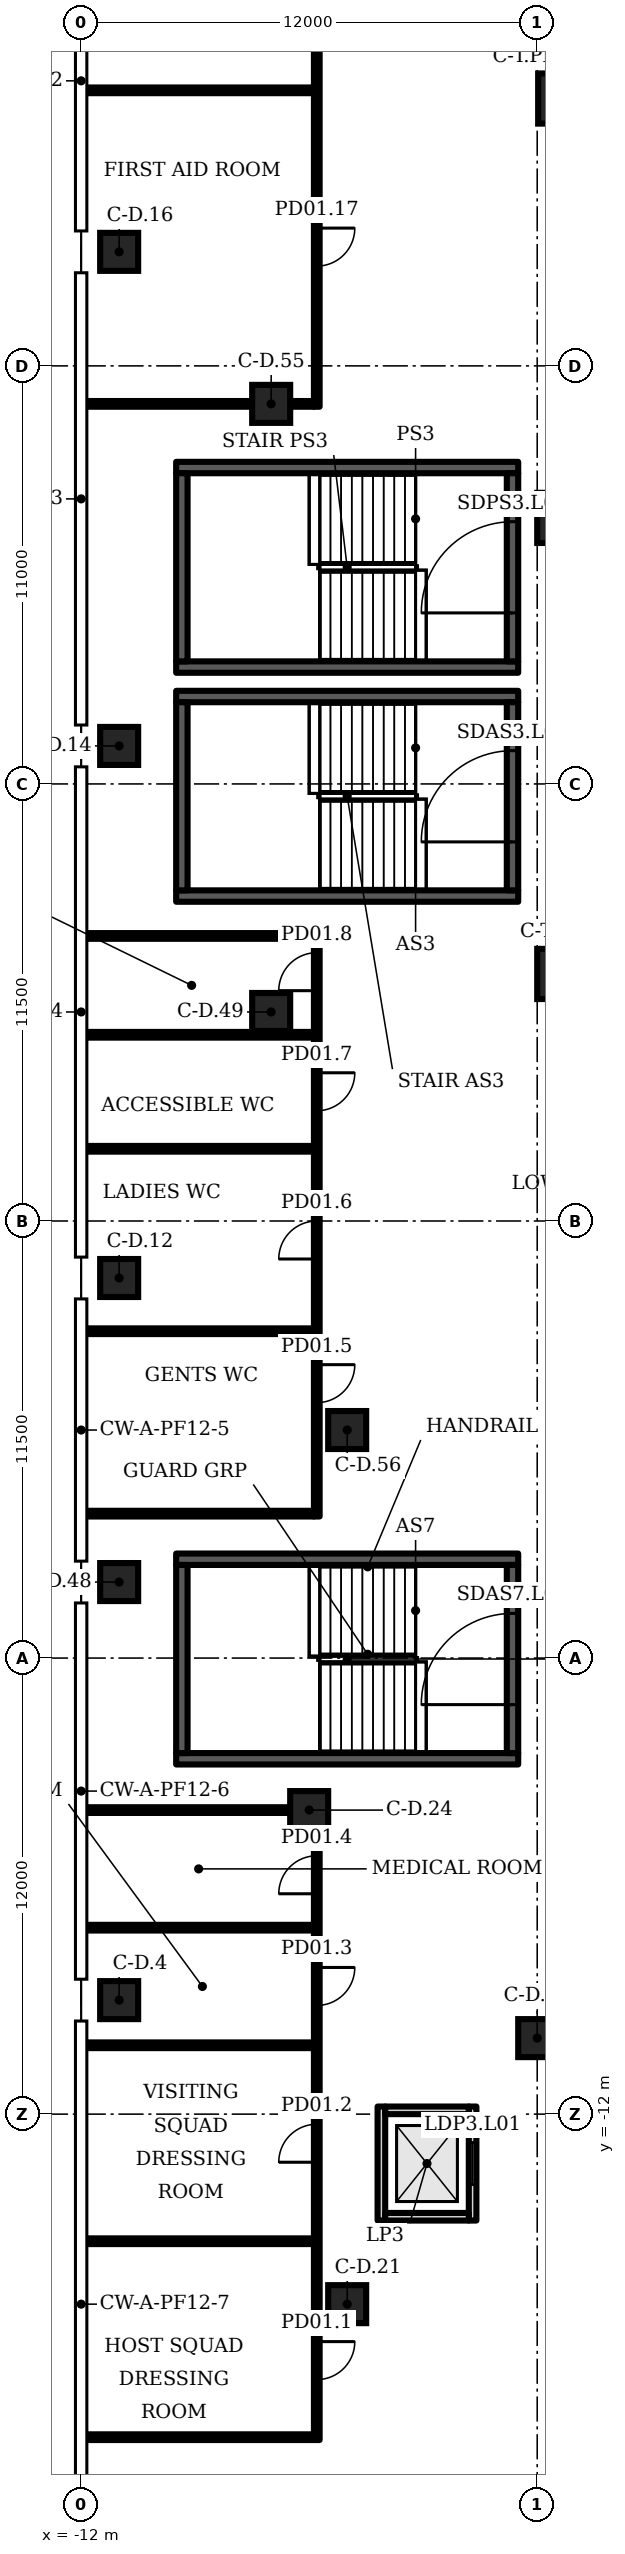
"""IFC4 building model, lengths in metres.
Left out: names, types, materials, properties, quantities, classifications, styles, units other than length and angle.
Written with IfcOpenShell. Run it as: python <this file> out.ifc"""

import sys

from ifc_helpers import new_model, si_unit, direction, frame, frame_2d, origin, origin_2d, place, context, subcontext, project, spatial, rectangle, extrude, element, fill, save


model = new_model("IFC4")
c1 = context("Model", 3, precision=1e-05, world=origin(), true_north=direction((0.0, 1.0)))
c2 = subcontext(c1, "Body", "Model", "MODEL_VIEW")
j1 = project(units=[si_unit("LENGTHUNIT", "METRE"), si_unit("PLANEANGLEUNIT", "RADIAN")], contexts=[c1])
p1 = place(None, origin())
s1 = spatial("IfcSite", under=j1, at=p1, CompositionType="ELEMENT")
p2 = place(p1, origin())
s2 = spatial("IfcBuilding", under=s1, at=p2, CompositionType="ELEMENT")
p3 = place(p2, frame((0.0, 0.0, 8.0)))
s3 = spatial("IfcBuildingStorey", under=s2, at=p3, CompositionType="ELEMENT", Elevation=8.0)
for number, where, z_axis, x_axis in (
    (1, (0.685, 41.034, 0.0), (0.0, 0.0, 1.0), (1.0, 0.0, 0.0)),
    (2, (0.66, 30.0, 0.0), (0.0, 0.0, 1.0), (1.0, 0.0, 0.0)),
    (3, (0.66, 18.0, 0.0), (0.0, 0.0, 1.0), (1.0, 0.0, 0.0)),
):
    element("IfcColumn", number, at=place(p3, frame(where, z_axis=z_axis, x_axis=x_axis)), inside=s3, PredefinedType="COLUMN", context=c2, shape_type="SweptSolid", body=[
        extrude(rectangle(XDim=1.32, YDim=1.32, at=origin_2d()), origin(), (0.0, 0.0, 1.0), 7.0),
    ])
for number, where, z_axis, x_axis in (
    (4, (-11.0, -9.0, 0.0), (0.0, 0.0, 1.0), (1.0, 0.0, 0.0)),
    (5, (-11.0, 10.0, 0.0), (0.0, 0.0, 1.0), (1.0, 0.0, 0.0)),
    (6, (-11.0, 24.0, 0.0), (0.0, 0.0, 1.0), (1.0, 0.0, 0.0)),
    (7, (-11.0, 37.0, 0.0), (0.0, 0.0, 1.0), (1.0, 0.0, 0.0)),
    (8, (-5.0, -17.0, 0.0), (0.0, 0.0, 1.0), (1.0, 0.0, 0.0)),
    (9, (-6.0, -4.0, 0.0), (0.0, 0.0, 1.0), (1.0, 0.0, 0.0)),
    (10, (0.0, -10.0, 0.0), (0.0, 0.0, 1.0), (1.0, 0.0, 0.0)),
    (11, (-11.0, 2.0, 0.0), (0.0, 0.0, 1.0), (1.0, 0.0, 0.0)),
    (12, (-7.0, 17.0, 0.0), (0.0, 0.0, 1.0), (1.0, 0.0, 0.0)),
    (13, (-7.0, 33.0, 0.0), (0.0, 0.0, 1.0), (1.0, 0.0, 0.0)),
    (14, (-5.0, 6.0, 0.0), (0.0, 0.0, 1.0), (1.0, 0.0, 0.0)),
):
    element("IfcColumn", number, at=place(p3, frame(where, z_axis=z_axis, x_axis=x_axis)), inside=s3, PredefinedType="COLUMN", context=c2, shape_type="SweptSolid", body=[
        extrude(rectangle(XDim=1.0, YDim=1.0, at=origin_2d()), origin(), (0.0, 0.0, 1.0), 7.0),
    ])
p4 = place(p3, frame((-11.895, -20.5, 0.0), z_axis=(0.0, 0.0, 1.0), x_axis=(1.0, 0.0, 0.0)))
e15 = element("IfcWall", 15, at=p4, inside=s3, PredefinedType="PARTITIONING", context=c2, shape_type="SweptSolid", body=[
    extrude(rectangle(XDim=6.02, YDim=0.15, at=frame_2d((3.01, 0.0))), origin(), (0.0, 0.0, 1.0), 6.7),
])
p5 = place(p3, frame((-5.8, -20.575, 0.0), z_axis=(0.0, 0.0, 1.0), x_axis=(0.0, 1.0, 0.0)))
e16 = element("IfcWall", 16, at=p5, inside=s3, PredefinedType="PARTITIONING", context=c2, shape_type="SweptSolid", body=[
    extrude(rectangle(XDim=16.065, YDim=0.15, at=frame_2d((8.032, 0.0))), origin(), (0.0, 0.0, 1.0), 6.7),
])
p6 = place(p5, frame((1.59, 0.0, 0.0)))
e17 = element("IfcOpeningElement", 17, at=p6, cuts=e16, PredefinedType="OPENING", context=c2, shape_type="SweptSolid", body=[
    extrude(rectangle(XDim=1.0, YDim=2.1, at=frame_2d((0.5, 1.05))), frame((0.0, 0.085, 0.0), z_axis=(0.0, -1.0, 0.0), x_axis=(1.0, 0.0, 0.0)), (0.0, 0.0, 1.0), 0.17),
])
p7 = place(p5, frame((7.309, 0.0, 0.0)))
e18 = element("IfcOpeningElement", 18, at=p7, cuts=e16, PredefinedType="OPENING", context=c2, shape_type="SweptSolid", body=[
    extrude(rectangle(XDim=1.0, YDim=2.1, at=frame_2d((0.5, 1.05))), frame((0.0, 0.085, 0.0), z_axis=(0.0, -1.0, 0.0), x_axis=(1.0, 0.0, 0.0)), (0.0, 0.0, 1.0), 0.17),
])
p8 = place(p5, frame((11.434, 0.0, 0.0)))
e19 = element("IfcOpeningElement", 19, at=p8, cuts=e16, PredefinedType="OPENING", context=c2, shape_type="SweptSolid", body=[
    extrude(rectangle(XDim=1.0, YDim=2.1, at=frame_2d((0.5, 1.05))), frame((0.0, 0.085, 0.0), z_axis=(0.0, -1.0, 0.0), x_axis=(1.0, 0.0, 0.0)), (0.0, 0.0, 1.0), 0.17),
])
p9 = place(p5, frame((14.373, 0.0, 0.0)))
e20 = element("IfcOpeningElement", 20, at=p9, cuts=e16, PredefinedType="OPENING", context=c2, shape_type="SweptSolid", body=[
    extrude(rectangle(XDim=1.0, YDim=2.1, at=frame_2d((0.5, 1.05))), frame((0.0, 0.085, 0.0), z_axis=(0.0, -1.0, 0.0), x_axis=(1.0, 0.0, 0.0)), (0.0, 0.0, 1.0), 0.17),
])
p10 = place(p3, frame((-5.8, 3.725, 0.0), z_axis=(0.0, 0.0, 1.0), x_axis=(0.0, 1.0, 0.0)))
e21 = element("IfcWall", 21, at=p10, inside=s3, PredefinedType="PARTITIONING", context=c2, shape_type="SweptSolid", body=[
    extrude(rectangle(XDim=15.35, YDim=0.15, at=frame_2d((7.675, 0.0))), origin(), (0.0, 0.0, 1.0), 6.7),
])
p11 = place(p10, frame((2.995, 0.0, 0.0)))
e22 = element("IfcOpeningElement", 22, at=p11, cuts=e21, PredefinedType="OPENING", context=c2, shape_type="SweptSolid", body=[
    extrude(rectangle(XDim=1.0, YDim=2.1, at=frame_2d((0.5, 1.05))), frame((0.0, 0.085, 0.0), z_axis=(0.0, -1.0, 0.0), x_axis=(1.0, 0.0, 0.0)), (0.0, 0.0, 1.0), 0.17),
])
p12 = place(p10, frame((6.775, 0.0, 0.0)))
e23 = element("IfcOpeningElement", 23, at=p12, cuts=e21, PredefinedType="OPENING", context=c2, shape_type="SweptSolid", body=[
    extrude(rectangle(XDim=1.0, YDim=2.1, at=frame_2d((0.5, 1.05))), frame((0.0, 0.085, 0.0), z_axis=(0.0, -1.0, 0.0), x_axis=(1.0, 0.0, 0.0)), (0.0, 0.0, 1.0), 0.17),
])
p13 = place(p10, frame((10.675, 0.0, 0.0)))
e24 = element("IfcOpeningElement", 24, at=p13, cuts=e21, PredefinedType="OPENING", context=c2, shape_type="SweptSolid", body=[
    extrude(rectangle(XDim=1.0, YDim=2.1, at=frame_2d((0.5, 1.05))), frame((0.0, 0.085, 0.0), z_axis=(0.0, -1.0, 0.0), x_axis=(1.0, 0.0, 0.0)), (0.0, 0.0, 1.0), 0.17),
])
p14 = place(p10, frame((13.835, 0.0, 0.0)))
e25 = element("IfcOpeningElement", 25, at=p14, cuts=e21, PredefinedType="OPENING", context=c2, shape_type="SweptSolid", body=[
    extrude(rectangle(XDim=1.0, YDim=2.1, at=frame_2d((0.5, 1.05))), frame((0.0, 0.085, 0.0), z_axis=(0.0, -1.0, 0.0), x_axis=(1.0, 0.0, 0.0)), (0.0, 0.0, 1.0), 0.17),
])
p15 = place(p3, frame((-5.8, 32.925, 0.0), z_axis=(0.0, 0.0, 1.0), x_axis=(0.0, 1.0, 0.0)))
e26 = element("IfcWall", 26, at=p15, inside=s3, PredefinedType="PARTITIONING", context=c2, shape_type="SweptSolid", body=[
    extrude(rectangle(XDim=16.65, YDim=0.15, at=frame_2d((8.325, 0.0))), origin(), (0.0, 0.0, 1.0), 6.7),
])
p16 = place(p15, frame((3.7, 0.0, 0.0)))
e27 = element("IfcOpeningElement", 27, at=p16, cuts=e26, PredefinedType="OPENING", context=c2, shape_type="SweptSolid", body=[
    extrude(rectangle(XDim=1.0, YDim=2.1, at=frame_2d((0.5, 1.05))), frame((0.0, 0.085, 0.0), z_axis=(0.0, -1.0, 0.0), x_axis=(1.0, 0.0, 0.0)), (0.0, 0.0, 1.0), 0.17),
])
p17 = place(p15, frame((11.95, 0.0, 0.0)))
e28 = element("IfcOpeningElement", 28, at=p17, cuts=e26, PredefinedType="OPENING", context=c2, shape_type="SweptSolid", body=[
    extrude(rectangle(XDim=1.0, YDim=2.1, at=frame_2d((0.5, 1.05))), frame((0.0, 0.085, 0.0), z_axis=(0.0, -1.0, 0.0), x_axis=(1.0, 0.0, 0.0)), (0.0, 0.0, 1.0), 0.17),
])
for number, where, z_axis, x_axis in (
    (29, (-11.895, -15.344, 0.0), (0.0, 0.0, 1.0), (1.0, 0.0, 0.0)),
    (30, (-11.895, -10.188, 0.0), (0.0, 0.0, 1.0), (1.0, 0.0, 0.0)),
    (31, (-11.895, -7.094, 0.0), (0.0, 0.0, 1.0), (1.0, 0.0, 0.0)),
):
    element("IfcWall", number, at=place(p3, frame(where, z_axis=z_axis, x_axis=x_axis)), inside=s3, PredefinedType="PARTITIONING", context=c2, shape_type="SweptSolid", body=[
        extrude(rectangle(XDim=6.02, YDim=0.15, at=frame_2d((3.01, 0.0))), origin(), (0.0, 0.0, 1.0), 6.7),
    ])
p18 = place(p3, frame((-11.895, -4.0, 0.0), z_axis=(0.0, 0.0, 1.0), x_axis=(1.0, 0.0, 0.0)))
e32 = element("IfcWall", 32, at=p18, inside=s3, PredefinedType="PARTITIONING", context=c2, shape_type="SweptSolid", body=[
    extrude(rectangle(XDim=5.385, YDim=0.15, at=frame_2d((2.692, 0.0))), origin(), (0.0, 0.0, 1.0), 6.7),
])
for number, where, z_axis, x_axis in (
    (33, (-11.895, 3.8, 0.0), (0.0, 0.0, 1.0), (1.0, 0.0, 0.0)),
    (34, (-11.895, 8.6, 0.0), (0.0, 0.0, 1.0), (1.0, 0.0, 0.0)),
    (35, (-11.895, 13.4, 0.0), (0.0, 0.0, 1.0), (1.0, 0.0, 0.0)),
    (36, (-11.895, 16.4, 0.0), (0.0, 0.0, 1.0), (1.0, 0.0, 0.0)),
    (37, (-11.895, 19.0, 0.0), (0.0, 0.0, 1.0), (1.0, 0.0, 0.0)),
):
    element("IfcWall", number, at=place(p3, frame(where, z_axis=z_axis, x_axis=x_axis)), inside=s3, PredefinedType="PARTITIONING", context=c2, shape_type="SweptSolid", body=[
        extrude(rectangle(XDim=6.02, YDim=0.15, at=frame_2d((3.01, 0.0))), origin(), (0.0, 0.0, 1.0), 6.7),
    ])
p19 = place(p3, frame((-11.895, 33.0, 0.0), z_axis=(0.0, 0.0, 1.0), x_axis=(1.0, 0.0, 0.0)))
e38 = element("IfcWall", 38, at=p19, inside=s3, PredefinedType="PARTITIONING", context=c2, shape_type="SweptSolid", body=[
    extrude(rectangle(XDim=4.385, YDim=0.15, at=frame_2d((2.192, 0.0))), origin(), (0.0, 0.0, 1.0), 6.7),
])
p20 = place(p3, frame((-6.49, 33.0, 0.0), z_axis=(0.0, 0.0, 1.0), x_axis=(1.0, 0.0, 0.0)))
e39 = element("IfcWall", 39, at=p20, inside=s3, PredefinedType="PARTITIONING", context=c2, shape_type="SweptSolid", body=[
    extrude(rectangle(XDim=0.615, YDim=0.15, at=frame_2d((0.308, 0.0))), origin(), (0.0, 0.0, 1.0), 6.7),
])
p21 = place(p3, frame((-11.895, 41.25, 0.0), z_axis=(0.0, 0.0, 1.0), x_axis=(1.0, 0.0, 0.0)))
e40 = element("IfcWall", 40, at=p21, inside=s3, PredefinedType="PARTITIONING", context=c2, shape_type="SweptSolid", body=[
    extrude(rectangle(XDim=6.02, YDim=0.15, at=frame_2d((3.01, 0.0))), origin(), (0.0, 0.0, 1.0), 6.7),
])
for number, where, z_axis, x_axis in (
    (41, (-9.5, -2.65, 0.0), (0.0, 0.0, 1.0), (1.0, 0.0, 0.0)),
    (42, (-9.5, 2.6, 0.0), (0.0, 0.0, 1.0), (1.0, 0.0, 0.0)),
):
    element("IfcWall", number, at=place(p3, frame(where, z_axis=z_axis, x_axis=x_axis)), inside=s3, PredefinedType="SHEAR", context=c2, shape_type="SweptSolid", body=[
        extrude(rectangle(XDim=9.0, YDim=0.3, at=frame_2d((4.5, 0.0))), origin(), (0.0, 0.0, 1.0), 6.7),
    ])
p22 = place(p3, frame((-9.35, -2.5, 0.0), z_axis=(0.0, 0.0, 1.0), x_axis=(0.0, 1.0, 0.0)))
e43 = element("IfcWall", 43, at=p22, inside=s3, PredefinedType="SHEAR", context=c2, shape_type="SweptSolid", body=[
    extrude(rectangle(XDim=4.95, YDim=0.3, at=frame_2d((2.475, 0.0))), origin(), (0.0, 0.0, 1.0), 6.7),
])
p23 = place(p3, frame((-0.65, -2.5, 0.0), z_axis=(0.0, 0.0, 1.0), x_axis=(0.0, 1.0, 0.0)))
e44 = element("IfcWall", 44, at=p23, inside=s3, PredefinedType="SHEAR", context=c2, shape_type="SweptSolid", body=[
    extrude(rectangle(XDim=4.95, YDim=0.3, at=frame_2d((2.475, 0.0))), origin(), (0.0, 0.0, 1.0), 6.7),
])
p24 = place(p23, frame((1.275, 0.0, 0.0)))
e45 = element("IfcOpeningElement", 45, at=p24, cuts=e44, PredefinedType="OPENING", context=c2, shape_type="SweptSolid", body=[
    extrude(rectangle(XDim=2.4, YDim=2.1, at=frame_2d((1.2, 1.05))), frame((0.0, 0.16, 0.0), z_axis=(0.0, -1.0, 0.0), x_axis=(1.0, 0.0, 0.0)), (0.0, 0.0, 1.0), 0.32),
])
for number, where, z_axis, x_axis in (
    (46, (-9.5, 20.05, 0.0), (0.0, 0.0, 1.0), (1.0, 0.0, 0.0)),
    (47, (-9.5, 25.3, 0.0), (0.0, 0.0, 1.0), (1.0, 0.0, 0.0)),
):
    element("IfcWall", number, at=place(p3, frame(where, z_axis=z_axis, x_axis=x_axis)), inside=s3, PredefinedType="SHEAR", context=c2, shape_type="SweptSolid", body=[
        extrude(rectangle(XDim=9.0, YDim=0.3, at=frame_2d((4.5, 0.0))), origin(), (0.0, 0.0, 1.0), 6.7),
    ])
p25 = place(p3, frame((-9.35, 20.2, 0.0), z_axis=(0.0, 0.0, 1.0), x_axis=(0.0, 1.0, 0.0)))
e48 = element("IfcWall", 48, at=p25, inside=s3, PredefinedType="SHEAR", context=c2, shape_type="SweptSolid", body=[
    extrude(rectangle(XDim=4.95, YDim=0.3, at=frame_2d((2.475, 0.0))), origin(), (0.0, 0.0, 1.0), 6.7),
])
p26 = place(p3, frame((-0.65, 20.2, 0.0), z_axis=(0.0, 0.0, 1.0), x_axis=(0.0, 1.0, 0.0)))
e49 = element("IfcWall", 49, at=p26, inside=s3, PredefinedType="SHEAR", context=c2, shape_type="SweptSolid", body=[
    extrude(rectangle(XDim=4.95, YDim=0.3, at=frame_2d((2.475, 0.0))), origin(), (0.0, 0.0, 1.0), 6.7),
])
p27 = place(p26, frame((1.275, 0.0, 0.0)))
e50 = element("IfcOpeningElement", 50, at=p27, cuts=e49, PredefinedType="OPENING", context=c2, shape_type="SweptSolid", body=[
    extrude(rectangle(XDim=2.4, YDim=2.1, at=frame_2d((1.2, 1.05))), frame((0.0, 0.16, 0.0), z_axis=(0.0, -1.0, 0.0), x_axis=(1.0, 0.0, 0.0)), (0.0, 0.0, 1.0), 0.32),
])
for number, where, z_axis, x_axis in (
    (51, (-9.5, 26.075, 0.0), (0.0, 0.0, 1.0), (1.0, 0.0, 0.0)),
    (52, (-9.5, 31.325, 0.0), (0.0, 0.0, 1.0), (1.0, 0.0, 0.0)),
):
    element("IfcWall", number, at=place(p3, frame(where, z_axis=z_axis, x_axis=x_axis)), inside=s3, PredefinedType="SHEAR", context=c2, shape_type="SweptSolid", body=[
        extrude(rectangle(XDim=9.0, YDim=0.3, at=frame_2d((4.5, 0.0))), origin(), (0.0, 0.0, 1.0), 6.7),
    ])
p28 = place(p3, frame((-9.35, 26.225, 0.0), z_axis=(0.0, 0.0, 1.0), x_axis=(0.0, 1.0, 0.0)))
e53 = element("IfcWall", 53, at=p28, inside=s3, PredefinedType="SHEAR", context=c2, shape_type="SweptSolid", body=[
    extrude(rectangle(XDim=4.95, YDim=0.3, at=frame_2d((2.475, 0.0))), origin(), (0.0, 0.0, 1.0), 6.7),
])
p29 = place(p3, frame((-0.65, 26.225, 0.0), z_axis=(0.0, 0.0, 1.0), x_axis=(0.0, 1.0, 0.0)))
e54 = element("IfcWall", 54, at=p29, inside=s3, PredefinedType="SHEAR", context=c2, shape_type="SweptSolid", body=[
    extrude(rectangle(XDim=4.95, YDim=0.3, at=frame_2d((2.475, 0.0))), origin(), (0.0, 0.0, 1.0), 6.7),
])
p30 = place(p29, frame((1.275, 0.0, 0.0)))
e55 = element("IfcOpeningElement", 55, at=p30, cuts=e54, PredefinedType="OPENING", context=c2, shape_type="SweptSolid", body=[
    extrude(rectangle(XDim=2.4, YDim=2.1, at=frame_2d((1.2, 1.05))), frame((0.0, 0.16, 0.0), z_axis=(0.0, -1.0, 0.0), x_axis=(1.0, 0.0, 0.0)), (0.0, 0.0, 1.0), 0.32),
])
p31 = place(p3, frame((-4.1, -14.8, 0.0), z_axis=(0.0, 0.0, 1.0), x_axis=(0.0, 1.0, 0.0)))
e56 = element("IfcWall", 56, at=p31, inside=s3, PredefinedType="PARTITIONING", context=c2, shape_type="SweptSolid", body=[
    extrude(rectangle(XDim=3.0, YDim=0.2, at=frame_2d((1.5, 0.0))), origin(), (0.0, 0.0, 1.0), 6.7),
])
p32 = place(p3, frame((-1.7, -14.8, 0.0), z_axis=(0.0, 0.0, 1.0), x_axis=(0.0, 1.0, 0.0)))
e57 = element("IfcWall", 57, at=p32, inside=s3, PredefinedType="PARTITIONING", context=c2, shape_type="SweptSolid", body=[
    extrude(rectangle(XDim=3.0, YDim=0.2, at=frame_2d((1.5, 0.0))), origin(), (0.0, 0.0, 1.0), 6.7),
])
p33 = place(p32, frame((0.95, 0.0, 0.0)))
e58 = element("IfcOpeningElement", 58, at=p33, cuts=e57, PredefinedType="OPENING", context=c2, shape_type="SweptSolid", body=[
    extrude(rectangle(XDim=1.1, YDim=2.1, at=frame_2d((0.55, 1.05))), frame((0.0, 0.11, 0.0), z_axis=(0.0, -1.0, 0.0), x_axis=(1.0, 0.0, 0.0)), (0.0, 0.0, 1.0), 0.22),
])
for number, where, z_axis, x_axis in (
    (59, (-4.0, -14.7, 0.0), (0.0, 0.0, 1.0), (1.0, 0.0, 0.0)),
    (60, (-4.0, -11.9, 0.0), (0.0, 0.0, 1.0), (1.0, 0.0, 0.0)),
):
    element("IfcWall", number, at=place(p3, frame(where, z_axis=z_axis, x_axis=x_axis)), inside=s3, PredefinedType="PARTITIONING", context=c2, shape_type="SweptSolid", body=[
        extrude(rectangle(XDim=2.2, YDim=0.2, at=frame_2d((1.1, 0.0))), origin(), (0.0, 0.0, 1.0), 6.7),
    ])
p34 = place(p6, origin())
e61 = element("IfcDoor", 61, at=p34, inside=s3, OperationType="SINGLE_SWING_RIGHT", PredefinedType="DOOR", context=c2, shape_type="SweptSolid", body=[
    extrude(rectangle(XDim=1.0, YDim=2.1, at=frame_2d((0.5, 1.05))), frame((0.0, 0.025, 0.0), z_axis=(0.0, -1.0, 0.0), x_axis=(1.0, 0.0, 0.0)), (0.0, 0.0, 1.0), 0.05),
])
fill(e17, e61)
p35 = place(p7, origin())
e62 = element("IfcDoor", 62, at=p35, inside=s3, OperationType="SINGLE_SWING_LEFT", PredefinedType="DOOR", context=c2, shape_type="SweptSolid", body=[
    extrude(rectangle(XDim=1.0, YDim=2.1, at=frame_2d((0.5, 1.05))), frame((0.0, 0.025, 0.0), z_axis=(0.0, -1.0, 0.0), x_axis=(1.0, 0.0, 0.0)), (0.0, 0.0, 1.0), 0.05),
])
fill(e18, e62)
p36 = place(p8, origin())
e63 = element("IfcDoor", 63, at=p36, inside=s3, OperationType="SINGLE_SWING_RIGHT", PredefinedType="DOOR", context=c2, shape_type="SweptSolid", body=[
    extrude(rectangle(XDim=1.0, YDim=2.1, at=frame_2d((0.5, 1.05))), frame((0.0, 0.025, 0.0), z_axis=(0.0, -1.0, 0.0), x_axis=(1.0, 0.0, 0.0)), (0.0, 0.0, 1.0), 0.05),
])
fill(e19, e63)
p37 = place(p9, origin())
e64 = element("IfcDoor", 64, at=p37, inside=s3, OperationType="SINGLE_SWING_LEFT", PredefinedType="DOOR", context=c2, shape_type="SweptSolid", body=[
    extrude(rectangle(XDim=1.0, YDim=2.1, at=frame_2d((0.5, 1.05))), frame((0.0, 0.025, 0.0), z_axis=(0.0, -1.0, 0.0), x_axis=(1.0, 0.0, 0.0)), (0.0, 0.0, 1.0), 0.05),
])
fill(e20, e64)
p38 = place(p11, origin())
e65 = element("IfcDoor", 65, at=p38, inside=s3, OperationType="SINGLE_SWING_RIGHT", PredefinedType="DOOR", context=c2, shape_type="SweptSolid", body=[
    extrude(rectangle(XDim=1.0, YDim=2.1, at=frame_2d((0.5, 1.05))), frame((0.0, 0.025, 0.0), z_axis=(0.0, -1.0, 0.0), x_axis=(1.0, 0.0, 0.0)), (0.0, 0.0, 1.0), 0.05),
])
fill(e22, e65)
p39 = place(p12, origin())
e66 = element("IfcDoor", 66, at=p39, inside=s3, OperationType="SINGLE_SWING_LEFT", PredefinedType="DOOR", context=c2, shape_type="SweptSolid", body=[
    extrude(rectangle(XDim=1.0, YDim=2.1, at=frame_2d((0.5, 1.05))), frame((0.0, 0.025, 0.0), z_axis=(0.0, -1.0, 0.0), x_axis=(1.0, 0.0, 0.0)), (0.0, 0.0, 1.0), 0.05),
])
fill(e23, e66)
p40 = place(p13, origin())
e67 = element("IfcDoor", 67, at=p40, inside=s3, OperationType="SINGLE_SWING_RIGHT", PredefinedType="DOOR", context=c2, shape_type="SweptSolid", body=[
    extrude(rectangle(XDim=1.0, YDim=2.1, at=frame_2d((0.5, 1.05))), frame((0.0, 0.025, 0.0), z_axis=(0.0, -1.0, 0.0), x_axis=(1.0, 0.0, 0.0)), (0.0, 0.0, 1.0), 0.05),
])
fill(e24, e67)
p41 = place(p14, origin())
e68 = element("IfcDoor", 68, at=p41, inside=s3, OperationType="SINGLE_SWING_LEFT", PredefinedType="DOOR", context=c2, shape_type="SweptSolid", body=[
    extrude(rectangle(XDim=1.0, YDim=2.1, at=frame_2d((0.5, 1.05))), frame((0.0, 0.025, 0.0), z_axis=(0.0, -1.0, 0.0), x_axis=(1.0, 0.0, 0.0)), (0.0, 0.0, 1.0), 0.05),
])
fill(e25, e68)
p42 = place(p16, origin())
e69 = element("IfcDoor", 69, at=p42, inside=s3, OperationType="SINGLE_SWING_RIGHT", PredefinedType="DOOR", context=c2, shape_type="SweptSolid", body=[
    extrude(rectangle(XDim=1.0, YDim=2.1, at=frame_2d((0.5, 1.05))), frame((0.0, 0.025, 0.0), z_axis=(0.0, -1.0, 0.0), x_axis=(1.0, 0.0, 0.0)), (0.0, 0.0, 1.0), 0.05),
])
fill(e27, e69)
p43 = place(p24, origin())
e70 = element("IfcDoor", 70, at=p43, inside=s3, OperationType="DOUBLE_DOOR_SINGLE_SWING", PredefinedType="DOOR", context=c2, shape_type="SweptSolid", body=[
    extrude(rectangle(XDim=2.4, YDim=2.1, at=frame_2d((1.2, 1.05))), frame((0.0, 0.025, 0.0), z_axis=(0.0, -1.0, 0.0), x_axis=(1.0, 0.0, 0.0)), (0.0, 0.0, 1.0), 0.05),
])
fill(e45, e70)
p44 = place(p27, origin())
e71 = element("IfcDoor", 71, at=p44, inside=s3, OperationType="DOUBLE_DOOR_SINGLE_SWING", PredefinedType="DOOR", context=c2, shape_type="SweptSolid", body=[
    extrude(rectangle(XDim=2.4, YDim=2.1, at=frame_2d((1.2, 1.05))), frame((0.0, 0.025, 0.0), z_axis=(0.0, -1.0, 0.0), x_axis=(1.0, 0.0, 0.0)), (0.0, 0.0, 1.0), 0.05),
])
fill(e50, e71)
p45 = place(p30, origin())
e72 = element("IfcDoor", 72, at=p45, inside=s3, OperationType="DOUBLE_DOOR_SINGLE_SWING", PredefinedType="DOOR", context=c2, shape_type="SweptSolid", body=[
    extrude(rectangle(XDim=2.4, YDim=2.1, at=frame_2d((1.2, 1.05))), frame((0.0, 0.025, 0.0), z_axis=(0.0, -1.0, 0.0), x_axis=(1.0, 0.0, 0.0)), (0.0, 0.0, 1.0), 0.05),
])
fill(e55, e72)
p46 = place(p33, origin())
e73 = element("IfcDoor", 73, at=p46, inside=s3, OperationType="DOUBLE_DOOR_SLIDING", PredefinedType="DOOR", context=c2, shape_type="SweptSolid", body=[
    extrude(rectangle(XDim=1.1, YDim=2.1, at=frame_2d((0.55, 1.05))), frame((0.0, 0.025, 0.0), z_axis=(0.0, -1.0, 0.0), x_axis=(1.0, 0.0, 0.0)), (0.0, 0.0, 1.0), 0.05),
])
fill(e58, e73)
save(model, sys.argv[1])
